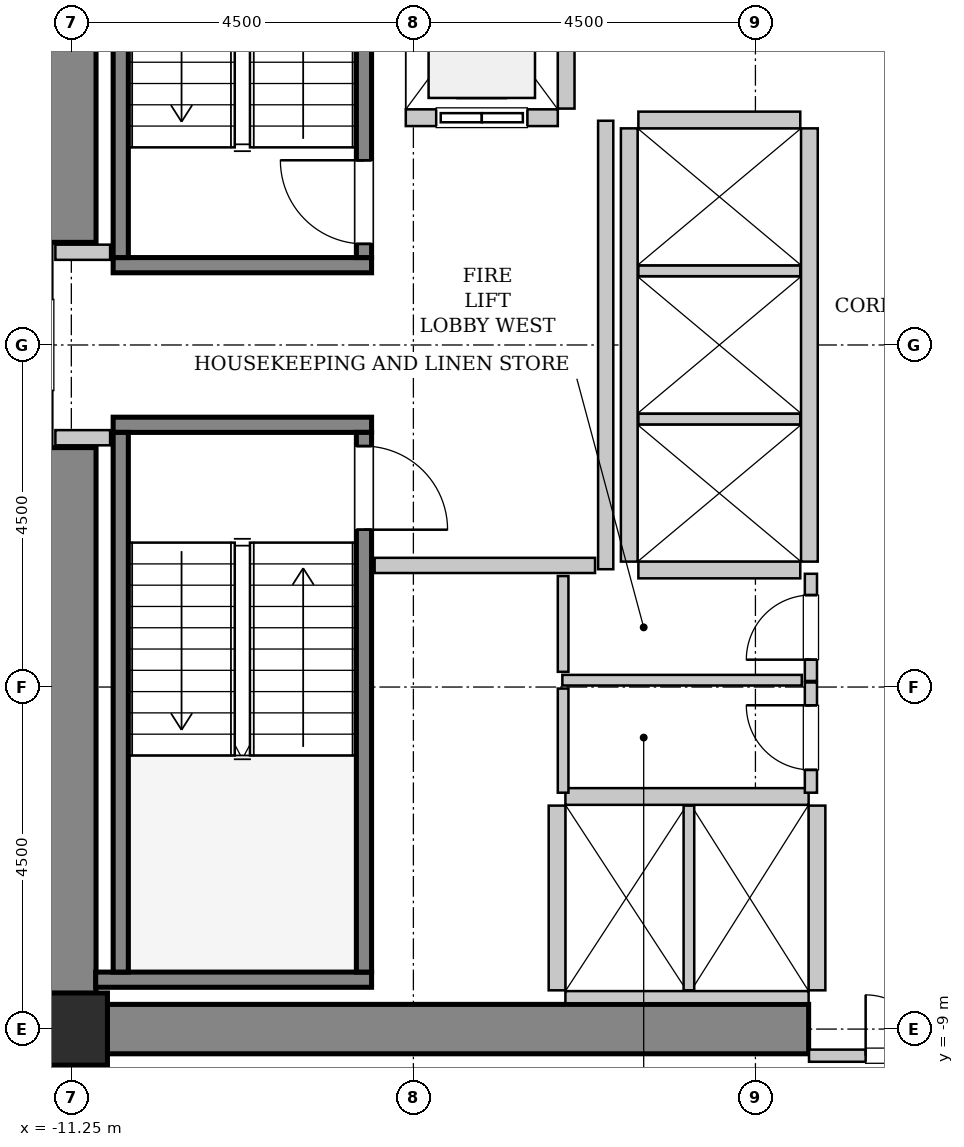
"""IFC4 building model, lengths in metres.
Left out: names, types, materials, properties, quantities, classifications, styles, units other than length and angle.
Written with IfcOpenShell. Run it as: python <this file> out.ifc"""

import sys

from ifc_helpers import new_model, si_unit, direction, frame, frame_2d, origin, origin_2d, place, context, subcontext, project, spatial, rectangle, hollow_rectangle, extrude, source, transform, mapped, element, fill, save


model = new_model("IFC4")
c1 = context("Model", 3, precision=1e-05, world=origin(), true_north=direction((0.0, 1.0)))
c2 = subcontext(c1, "Body", "Model", "MODEL_VIEW")
j1 = project(units=[si_unit("LENGTHUNIT", "METRE"), si_unit("PLANEANGLEUNIT", "RADIAN")], contexts=[c1])
p1 = place(None, origin())
s1 = spatial("IfcSite", under=j1, at=p1, CompositionType="ELEMENT")
p2 = place(p1, origin())
s2 = spatial("IfcBuilding", under=s1, at=p2, CompositionType="ELEMENT")
p3 = place(p2, frame((0.0, 0.0, 71.0)))
s3 = spatial("IfcBuildingStorey", under=s2, at=p3, CompositionType="ELEMENT", Elevation=71.0)
m1 = source(origin(), c2, "Body", "SweptSolid", [
    extrude(rectangle(XDim=10.025, YDim=0.65, at=frame_2d((5.012, 0.0))), origin(), (0.0, 0.0, 1.0), 3.8),
])
p4 = place(p3, frame((-11.575, -9.0, 0.0), z_axis=(0.0, 0.0, 1.0), x_axis=(1.0, 0.0, 0.0)))
e1 = element("IfcWall", 1, at=p4, inside=s3, PredefinedType="SHEAR", context=c2, shape_type="MappedRepresentation", body=[
    mapped(m1, transform((0.0, 0.0, 0.0), x_axis=(1.0, 0.0, 0.0), y_axis=(0.0, 1.0, 0.0), z_axis=(0.0, 0.0, 1.0), scale=1.0)),
])
m2 = source(origin(), c2, "Body", "SweptSolid", [
    extrude(rectangle(XDim=7.325, YDim=0.65, at=frame_2d((3.663, 0.0))), origin(), (0.0, 0.0, 1.0), 3.8),
])
for number, where, z_axis, x_axis in (
    (2, (-11.25, -8.675, 0.0), (0.0, 0.0, 1.0), (0.0, 1.0, 0.0)),
    (3, (-11.25, 1.35, 0.0), (0.0, 0.0, 1.0), (0.0, 1.0, 0.0)),
):
    element("IfcWall", number, at=place(p3, frame(where, z_axis=z_axis, x_axis=x_axis)), inside=s3, PredefinedType="SHEAR", context=c2, shape_type="MappedRepresentation", body=[
        mapped(m2, transform((0.0, 0.0, 0.0), x_axis=(1.0, 0.0, 0.0), y_axis=(0.0, 1.0, 0.0), z_axis=(0.0, 0.0, 1.0), scale=1.0)),
    ])
m3 = source(origin(), c2, "Body", "SweptSolid", [
    extrude(hollow_rectangle(XDim=0.95, YDim=0.95, WallThickness=0.045, InnerFilletRadius=0.045, OuterFilletRadius=0.09, at=origin_2d()), origin(), (0.0, 0.0, 1.0), 3.8),
])
p5 = place(p3, frame((-11.25, -9.0, 0.0), z_axis=(0.0, 0.0, 1.0), x_axis=(1.0, 0.0, 0.0)))
e4 = element("IfcColumn", 4, at=p5, inside=s3, PredefinedType="COLUMN", context=c2, shape_type="MappedRepresentation", body=[
    mapped(m3, transform((0.0, 0.0, 0.0), x_axis=(1.0, 0.0, 0.0), y_axis=(0.0, 1.0, 0.0), z_axis=(0.0, 0.0, 1.0), scale=1.0)),
])
m4 = source(origin(), c2, "Body", "SweptSolid", [
    extrude(rectangle(XDim=3.4, YDim=0.2, at=frame_2d((1.7, 0.0))), origin(), (0.0, 0.0, 1.0), 3.8),
])
p6 = place(p3, frame((-7.3, 1.05, 0.0), z_axis=(0.0, 0.0, 1.0), x_axis=(-1.0, 0.0, 0.0)))
e5 = element("IfcWall", 5, at=p6, inside=s3, PredefinedType="SOLIDWALL", context=c2, shape_type="MappedRepresentation", body=[
    mapped(m4, transform((0.0, 0.0, 0.0), x_axis=(1.0, 0.0, 0.0), y_axis=(0.0, 1.0, 0.0), z_axis=(0.0, 0.0, 1.0), scale=1.0)),
])
m5 = source(origin(), c2, "Body", "SweptSolid", [
    extrude(rectangle(XDim=7.1, YDim=0.2, at=frame_2d((3.55, 0.0))), origin(), (0.0, 0.0, 1.0), 3.8),
])
p7 = place(p3, frame((-7.4, 1.15, 0.0), z_axis=(0.0, 0.0, 1.0), x_axis=(0.0, 1.0, 0.0)))
e6 = element("IfcWall", 6, at=p7, inside=s3, PredefinedType="SOLIDWALL", context=c2, shape_type="MappedRepresentation", body=[
    mapped(m5, transform((0.0, 0.0, 0.0), x_axis=(1.0, 0.0, 0.0), y_axis=(0.0, 1.0, 0.0), z_axis=(0.0, 0.0, 1.0), scale=1.0)),
])
p8 = place(p7, frame((0.18, 0.0, 0.0)))
e7 = element("IfcOpeningElement", 7, at=p8, cuts=e6, PredefinedType="OPENING", context=c2, shape_type="SweptSolid", body=[
    extrude(rectangle(XDim=1.1, YDim=2.15, at=frame_2d((0.55, 1.075))), frame((0.0, 0.11, 0.0), z_axis=(0.0, -1.0, 0.0), x_axis=(1.0, 0.0, 0.0)), (0.0, 0.0, 1.0), 0.22),
])
p9 = place(p3, frame((-10.6, 1.15, 0.0), z_axis=(0.0, 0.0, 1.0), x_axis=(0.0, 1.0, 0.0)))
e8 = element("IfcWall", 8, at=p9, inside=s3, PredefinedType="SOLIDWALL", context=c2, shape_type="MappedRepresentation", body=[
    mapped(m5, transform((0.0, 0.0, 0.0), x_axis=(1.0, 0.0, 0.0), y_axis=(0.0, 1.0, 0.0), z_axis=(0.0, 0.0, 1.0), scale=1.0)),
])
p10 = place(p3, frame((-10.7, -1.05, 0.0), z_axis=(0.0, 0.0, 1.0), x_axis=(1.0, 0.0, 0.0)))
e9 = element("IfcWall", 9, at=p10, inside=s3, PredefinedType="SOLIDWALL", context=c2, shape_type="MappedRepresentation", body=[
    mapped(m4, transform((0.0, 0.0, 0.0), x_axis=(1.0, 0.0, 0.0), y_axis=(0.0, 1.0, 0.0), z_axis=(0.0, 0.0, 1.0), scale=1.0)),
])
m6 = source(origin(), c2, "Body", "SweptSolid", [
    extrude(rectangle(XDim=3.63, YDim=0.2, at=frame_2d((1.815, 0.0))), origin(), (0.0, 0.0, 1.0), 3.8),
])
p11 = place(p3, frame((-10.93, -8.35, 0.0), z_axis=(0.0, 0.0, 1.0), x_axis=(1.0, 0.0, 0.0)))
e10 = element("IfcWall", 10, at=p11, inside=s3, PredefinedType="SOLIDWALL", context=c2, shape_type="MappedRepresentation", body=[
    mapped(m6, transform((0.0, 0.0, 0.0), x_axis=(1.0, 0.0, 0.0), y_axis=(0.0, 1.0, 0.0), z_axis=(0.0, 0.0, 1.0), scale=1.0)),
])
p12 = place(p3, frame((-10.6, -1.15, 0.0), z_axis=(0.0, 0.0, 1.0), x_axis=(0.0, -1.0, 0.0)))
e11 = element("IfcWall", 11, at=p12, inside=s3, PredefinedType="SOLIDWALL", context=c2, shape_type="MappedRepresentation", body=[
    mapped(m5, transform((0.0, 0.0, 0.0), x_axis=(1.0, 0.0, 0.0), y_axis=(0.0, 1.0, 0.0), z_axis=(0.0, 0.0, 1.0), scale=1.0)),
])
p13 = place(p3, frame((-7.4, -1.15, 0.0), z_axis=(0.0, 0.0, 1.0), x_axis=(0.0, -1.0, 0.0)))
e12 = element("IfcWall", 12, at=p13, inside=s3, PredefinedType="SOLIDWALL", context=c2, shape_type="MappedRepresentation", body=[
    mapped(m5, transform((0.0, 0.0, 0.0), x_axis=(1.0, 0.0, 0.0), y_axis=(0.0, 1.0, 0.0), z_axis=(0.0, 0.0, 1.0), scale=1.0)),
])
p14 = place(p13, frame((0.18, 0.0, 0.0)))
e13 = element("IfcOpeningElement", 13, at=p14, cuts=e12, PredefinedType="OPENING", context=c2, shape_type="SweptSolid", body=[
    extrude(rectangle(XDim=1.1, YDim=2.15, at=frame_2d((0.55, 1.075))), frame((0.0, 0.11, 0.0), z_axis=(0.0, -1.0, 0.0), x_axis=(1.0, 0.0, 0.0)), (0.0, 0.0, 1.0), 0.22),
])
m7 = source(origin(), c2, "Body", "SweptSolid", [
    extrude(rectangle(XDim=2.0, YDim=0.22, at=frame_2d((1.0, 0.0))), origin(), (0.0, 0.0, 1.0), 3.535),
])
p15 = place(p3, frame((-6.85, 2.99, 0.0), z_axis=(0.0, 0.0, 1.0), x_axis=(1.0, 0.0, 0.0)))
e14 = element("IfcWall", 14, at=p15, inside=s3, PredefinedType="SOLIDWALL", context=c2, shape_type="MappedRepresentation", body=[
    mapped(m7, transform((0.0, 0.0, 0.0), x_axis=(1.0, 0.0, 0.0), y_axis=(0.0, 1.0, 0.0), z_axis=(0.0, 0.0, 1.0), scale=1.0)),
])
p16 = place(p15, frame((0.4, 0.0, 0.0)))
e15 = element("IfcOpeningElement", 15, at=p16, cuts=e14, PredefinedType="OPENING", context=c2, shape_type="SweptSolid", body=[
    extrude(rectangle(XDim=1.2, YDim=2.2, at=frame_2d((0.6, 1.1))), frame((0.0, 0.12, 0.0), z_axis=(0.0, -1.0, 0.0), x_axis=(1.0, 0.0, 0.0)), (0.0, 0.0, 1.0), 0.24),
])
m8 = source(origin(), c2, "Body", "SweptSolid", [
    extrude(rectangle(XDim=2.68, YDim=0.22, at=frame_2d((1.34, 0.0))), origin(), (0.0, 0.0, 1.0), 3.535),
])
p17 = place(p3, frame((-4.74, 3.11, 0.0), z_axis=(0.0, 0.0, 1.0), x_axis=(0.0, 1.0, 0.0)))
e16 = element("IfcWall", 16, at=p17, inside=s3, PredefinedType="SOLIDWALL", context=c2, shape_type="MappedRepresentation", body=[
    mapped(m8, transform((0.0, 0.0, 0.0), x_axis=(1.0, 0.0, 0.0), y_axis=(0.0, 1.0, 0.0), z_axis=(0.0, 0.0, 1.0), scale=1.0)),
])
m9 = source(origin(), c2, "Body", "SweptSolid", [
    extrude(rectangle(XDim=3.2, YDim=0.22, at=frame_2d((1.6, 0.0))), origin(), (0.0, 0.0, 1.0), 3.535),
])
p18 = place(p3, frame((-1.55, -5.94, 0.0), z_axis=(0.0, 0.0, 1.0), x_axis=(-1.0, 0.0, 0.0)))
e17 = element("IfcWall", 17, at=p18, inside=s3, PredefinedType="SOLIDWALL", context=c2, shape_type="MappedRepresentation", body=[
    mapped(m9, transform((0.0, 0.0, 0.0), x_axis=(1.0, 0.0, 0.0), y_axis=(0.0, 1.0, 0.0), z_axis=(0.0, 0.0, 1.0), scale=1.0)),
])
m10 = source(origin(), c2, "Body", "SweptSolid", [
    extrude(rectangle(XDim=3.2, YDim=0.16, at=frame_2d((1.6, 0.0))), origin(), (0.0, 0.0, 1.0), 2.425),
])
p19 = place(p3, frame((-4.75, -8.58, 0.0), z_axis=(0.0, 0.0, 1.0), x_axis=(1.0, 0.0, 0.0)))
e18 = element("IfcWall", 18, at=p19, inside=s3, PredefinedType="PARTITIONING", context=c2, shape_type="MappedRepresentation", body=[
    mapped(m10, transform((0.0, 0.0, 0.0), x_axis=(1.0, 0.0, 0.0), y_axis=(0.0, 1.0, 0.0), z_axis=(0.0, 0.0, 1.0), scale=1.0)),
])
m11 = source(origin(), c2, "Body", "SweptSolid", [
    extrude(rectangle(XDim=2.43, YDim=0.22, at=frame_2d((1.215, 0.0))), origin(), (0.0, 0.0, 1.0), 3.535),
])
p20 = place(p3, frame((-4.86, -6.06, 0.0), z_axis=(0.0, 0.0, 1.0), x_axis=(0.0, -1.0, 0.0)))
e19 = element("IfcWall", 19, at=p20, inside=s3, PredefinedType="SOLIDWALL", context=c2, shape_type="MappedRepresentation", body=[
    mapped(m11, transform((0.0, 0.0, 0.0), x_axis=(1.0, 0.0, 0.0), y_axis=(0.0, 1.0, 0.0), z_axis=(0.0, 0.0, 1.0), scale=1.0)),
])
m12 = source(origin(), c2, "Body", "SweptSolid", [
    extrude(rectangle(XDim=2.43, YDim=0.14, at=frame_2d((1.215, 0.0))), origin(), (0.0, 0.0, 1.0), 3.535),
])
p21 = place(p3, frame((-3.125, -8.49, 0.0), z_axis=(0.0, 0.0, 1.0), x_axis=(0.0, 1.0, 0.0)))
e20 = element("IfcWall", 20, at=p21, inside=s3, PredefinedType="PARTITIONING", context=c2, shape_type="MappedRepresentation", body=[
    mapped(m12, transform((0.0, 0.0, 0.0), x_axis=(1.0, 0.0, 0.0), y_axis=(0.0, 1.0, 0.0), z_axis=(0.0, 0.0, 1.0), scale=1.0)),
])
p22 = place(p3, frame((-1.44, -8.49, 0.0), z_axis=(0.0, 0.0, 1.0), x_axis=(0.0, 1.0, 0.0)))
e21 = element("IfcWall", 21, at=p22, inside=s3, PredefinedType="SOLIDWALL", context=c2, shape_type="MappedRepresentation", body=[
    mapped(m11, transform((0.0, 0.0, 0.0), x_axis=(1.0, 0.0, 0.0), y_axis=(0.0, 1.0, 0.0), z_axis=(0.0, 0.0, 1.0), scale=1.0)),
])
m13 = source(origin(), c2, "Body", "SweptSolid", [
    extrude(rectangle(XDim=5.7, YDim=0.22, at=frame_2d((2.85, 0.0))), origin(), (0.0, 0.0, 1.0), 3.535),
])
for number, where, z_axis, x_axis in (
    (22, (-1.54, -2.85, 0.0), (0.0, 0.0, 1.0), (0.0, 1.0, 0.0)),
    (23, (-3.91, 2.85, 0.0), (0.0, 0.0, 1.0), (0.0, -1.0, 0.0)),
):
    element("IfcWall", number, at=place(p3, frame(where, z_axis=z_axis, x_axis=x_axis)), inside=s3, PredefinedType="SOLIDWALL", context=c2, shape_type="MappedRepresentation", body=[
        mapped(m13, transform((0.0, 0.0, 0.0), x_axis=(1.0, 0.0, 0.0), y_axis=(0.0, 1.0, 0.0), z_axis=(0.0, 0.0, 1.0), scale=1.0)),
    ])
m14 = source(origin(), c2, "Body", "SweptSolid", [
    extrude(rectangle(XDim=2.13, YDim=0.22, at=frame_2d((1.065, 0.0))), origin(), (0.0, 0.0, 1.0), 3.535),
])
p23 = place(p3, frame((-3.79, -2.96, 0.0), z_axis=(0.0, 0.0, 1.0), x_axis=(1.0, 0.0, 0.0)))
e24 = element("IfcWall", 24, at=p23, inside=s3, PredefinedType="SOLIDWALL", context=c2, shape_type="MappedRepresentation", body=[
    mapped(m14, transform((0.0, 0.0, 0.0), x_axis=(1.0, 0.0, 0.0), y_axis=(0.0, 1.0, 0.0), z_axis=(0.0, 0.0, 1.0), scale=1.0)),
])
m15 = source(origin(), c2, "Body", "SweptSolid", [
    extrude(rectangle(XDim=2.13, YDim=0.14, at=frame_2d((1.065, 0.0))), origin(), (0.0, 0.0, 1.0), 3.535),
])
for number, where, z_axis, x_axis in (
    (25, (-3.79, -0.975, 0.0), (0.0, 0.0, 1.0), (1.0, 0.0, 0.0)),
    (26, (-3.79, 0.975, 0.0), (0.0, 0.0, 1.0), (1.0, 0.0, 0.0)),
):
    element("IfcWall", number, at=place(p3, frame(where, z_axis=z_axis, x_axis=x_axis)), inside=s3, PredefinedType="PARTITIONING", context=c2, shape_type="MappedRepresentation", body=[
        mapped(m15, transform((0.0, 0.0, 0.0), x_axis=(1.0, 0.0, 0.0), y_axis=(0.0, 1.0, 0.0), z_axis=(0.0, 0.0, 1.0), scale=1.0)),
    ])
p24 = place(p3, frame((-1.66, 2.96, 0.0), z_axis=(0.0, 0.0, 1.0), x_axis=(-1.0, 0.0, 0.0)))
e27 = element("IfcWall", 27, at=p24, inside=s3, PredefinedType="SOLIDWALL", context=c2, shape_type="MappedRepresentation", body=[
    mapped(m14, transform((0.0, 0.0, 0.0), x_axis=(1.0, 0.0, 0.0), y_axis=(0.0, 1.0, 0.0), z_axis=(0.0, 0.0, 1.0), scale=1.0)),
])
m16 = source(origin(), c2, "Body", "SweptSolid", [
    extrude(rectangle(XDim=5.9, YDim=0.2, at=frame_2d((2.95, 0.0))), origin(), (0.0, 0.0, 1.0), 3.535),
])
p25 = place(p3, frame((-4.22, -2.95, 0.0), z_axis=(0.0, 0.0, 1.0), x_axis=(0.0, 1.0, 0.0)))
e28 = element("IfcWall", 28, at=p25, inside=s3, PredefinedType="PARTITIONING", context=c2, shape_type="MappedRepresentation", body=[
    mapped(m16, transform((0.0, 0.0, 0.0), x_axis=(1.0, 0.0, 0.0), y_axis=(0.0, 1.0, 0.0), z_axis=(0.0, 0.0, 1.0), scale=1.0)),
])
m17 = source(origin(), c2, "Body", "SweptSolid", [
    extrude(rectangle(XDim=2.9, YDim=0.2, at=frame_2d((1.45, 0.0))), origin(), (0.0, 0.0, 1.0), 3.535),
])
p26 = place(p3, frame((-7.26, -2.9, 0.0), z_axis=(0.0, 0.0, 1.0), x_axis=(1.0, 0.0, 0.0)))
e29 = element("IfcWall", 29, at=p26, inside=s3, PredefinedType="PARTITIONING", context=c2, shape_type="MappedRepresentation", body=[
    mapped(m17, transform((0.0, 0.0, 0.0), x_axis=(1.0, 0.0, 0.0), y_axis=(0.0, 1.0, 0.0), z_axis=(0.0, 0.0, 1.0), scale=1.0)),
])
m18 = source(origin(), c2, "Body", "SweptSolid", [
    extrude(rectangle(XDim=0.72, YDim=0.2, at=frame_2d((0.36, 0.0))), origin(), (0.0, 0.0, 1.0), 3.535),
])
for number, where, z_axis, x_axis in (
    (30, (-11.46, 1.22, 0.0), (0.0, 0.0, 1.0), (1.0, 0.0, 0.0)),
    (31, (-11.46, -1.22, 0.0), (0.0, 0.0, 1.0), (1.0, 0.0, 0.0)),
):
    element("IfcWall", number, at=place(p3, frame(where, z_axis=z_axis, x_axis=x_axis)), inside=s3, PredefinedType="PARTITIONING", context=c2, shape_type="MappedRepresentation", body=[
        mapped(m18, transform((0.0, 0.0, 0.0), x_axis=(1.0, 0.0, 0.0), y_axis=(0.0, 1.0, 0.0), z_axis=(0.0, 0.0, 1.0), scale=1.0)),
    ])
m19 = source(origin(), c2, "Body", "SweptSolid", [
    extrude(rectangle(XDim=3.09, YDim=0.16, at=frame_2d((1.545, 0.0))), origin(), (0.0, 0.0, 1.0), 2.425),
])
p27 = place(p3, frame((-1.545, -9.35, 0.0), z_axis=(0.0, 0.0, 1.0), x_axis=(1.0, 0.0, 0.0)))
e32 = element("IfcWall", 32, at=p27, inside=s3, PredefinedType="PARTITIONING", context=c2, shape_type="MappedRepresentation", body=[
    mapped(m19, transform((0.0, 0.0, 0.0), x_axis=(1.0, 0.0, 0.0), y_axis=(0.0, 1.0, 0.0), z_axis=(0.0, 0.0, 1.0), scale=1.0)),
])
p28 = place(p27, frame((0.745, 0.0, 0.0)))
e33 = element("IfcOpeningElement", 33, at=p28, cuts=e32, PredefinedType="OPENING", context=c2, shape_type="SweptSolid", body=[
    extrude(rectangle(XDim=1.6, YDim=2.3, at=frame_2d((0.8, 1.15))), frame((0.0, 0.09, 0.0), z_axis=(0.0, -1.0, 0.0), x_axis=(1.0, 0.0, 0.0)), (0.0, 0.0, 1.0), 0.18),
])
m20 = source(origin(), c2, "Body", "SweptSolid", [
    extrude(rectangle(XDim=1.41, YDim=0.16, at=frame_2d((0.705, 0.0))), origin(), (0.0, 0.0, 1.0), 3.535),
])
p29 = place(p3, frame((-1.52, -4.42, 0.0), z_axis=(0.0, 0.0, 1.0), x_axis=(0.0, 1.0, 0.0)))
e34 = element("IfcWall", 34, at=p29, inside=s3, PredefinedType="PARTITIONING", context=c2, shape_type="MappedRepresentation", body=[
    mapped(m20, transform((0.0, 0.0, 0.0), x_axis=(1.0, 0.0, 0.0), y_axis=(0.0, 1.0, 0.0), z_axis=(0.0, 0.0, 1.0), scale=1.0)),
])
p30 = place(p29, frame((0.28, 0.0, 0.0)))
e35 = element("IfcOpeningElement", 35, at=p30, cuts=e34, PredefinedType="OPENING", context=c2, shape_type="SweptSolid", body=[
    extrude(rectangle(XDim=0.85, YDim=2.1, at=frame_2d((0.425, 1.05))), frame((0.0, 0.09, 0.0), z_axis=(0.0, -1.0, 0.0), x_axis=(1.0, 0.0, 0.0)), (0.0, 0.0, 1.0), 0.18),
])
m21 = source(origin(), c2, "Body", "SweptSolid", [
    extrude(rectangle(XDim=3.15, YDim=0.14, at=frame_2d((1.575, 0.0))), origin(), (0.0, 0.0, 1.0), 3.535),
])
p31 = place(p3, frame((-4.79, -4.41, 0.0), z_axis=(0.0, 0.0, 1.0), x_axis=(1.0, 0.0, 0.0)))
e36 = element("IfcWall", 36, at=p31, inside=s3, PredefinedType="PARTITIONING", context=c2, shape_type="MappedRepresentation", body=[
    mapped(m21, transform((0.0, 0.0, 0.0), x_axis=(1.0, 0.0, 0.0), y_axis=(0.0, 1.0, 0.0), z_axis=(0.0, 0.0, 1.0), scale=1.0)),
])
m22 = source(origin(), c2, "Body", "SweptSolid", [
    extrude(rectangle(XDim=1.26, YDim=0.14, at=frame_2d((0.63, 0.0))), origin(), (0.0, 0.0, 1.0), 3.535),
])
p32 = place(p3, frame((-4.78, -4.3, 0.0), z_axis=(0.0, 0.0, 1.0), x_axis=(0.0, 1.0, 0.0)))
e37 = element("IfcWall", 37, at=p32, inside=s3, PredefinedType="PARTITIONING", context=c2, shape_type="MappedRepresentation", body=[
    mapped(m22, transform((0.0, 0.0, 0.0), x_axis=(1.0, 0.0, 0.0), y_axis=(0.0, 1.0, 0.0), z_axis=(0.0, 0.0, 1.0), scale=1.0)),
])
m23 = source(origin(), c2, "Body", "SweptSolid", [
    extrude(rectangle(XDim=1.45, YDim=0.16, at=frame_2d((0.725, 0.0))), origin(), (0.0, 0.0, 1.0), 3.535),
])
p33 = place(p3, frame((-1.52, -5.89, 0.0), z_axis=(0.0, 0.0, 1.0), x_axis=(0.0, 1.0, 0.0)))
e38 = element("IfcWall", 38, at=p33, inside=s3, PredefinedType="PARTITIONING", context=c2, shape_type="MappedRepresentation", body=[
    mapped(m23, transform((0.0, 0.0, 0.0), x_axis=(1.0, 0.0, 0.0), y_axis=(0.0, 1.0, 0.0), z_axis=(0.0, 0.0, 1.0), scale=1.0)),
])
p34 = place(p33, frame((0.3, 0.0, 0.0)))
e39 = element("IfcOpeningElement", 39, at=p34, cuts=e38, PredefinedType="OPENING", context=c2, shape_type="SweptSolid", body=[
    extrude(rectangle(XDim=0.85, YDim=2.1, at=frame_2d((0.425, 1.05))), frame((0.0, 0.09, 0.0), z_axis=(0.0, -1.0, 0.0), x_axis=(1.0, 0.0, 0.0)), (0.0, 0.0, 1.0), 0.18),
])
m24 = source(origin(), c2, "Body", "SweptSolid", [
    extrude(rectangle(XDim=1.37, YDim=0.14, at=frame_2d((0.685, 0.0))), origin(), (0.0, 0.0, 1.0), 3.535),
])
p35 = place(p3, frame((-4.78, -5.89, 0.0), z_axis=(0.0, 0.0, 1.0), x_axis=(0.0, 1.0, 0.0)))
e40 = element("IfcWall", 40, at=p35, inside=s3, PredefinedType="PARTITIONING", context=c2, shape_type="MappedRepresentation", body=[
    mapped(m24, transform((0.0, 0.0, 0.0), x_axis=(1.0, 0.0, 0.0), y_axis=(0.0, 1.0, 0.0), z_axis=(0.0, 0.0, 1.0), scale=1.0)),
])
m25 = source(origin(), c2, "Body", "SweptSolid", [
    extrude(rectangle(XDim=1.1, YDim=2.15, at=frame_2d((0.55, 1.075))), frame((0.0, 0.025, 0.0), z_axis=(0.0, -1.0, 0.0), x_axis=(1.0, 0.0, 0.0)), (0.0, 0.0, 1.0), 0.05),
])
p36 = place(p8, origin())
e41 = element("IfcDoor", 41, at=p36, inside=s3, OperationType="SINGLE_SWING_RIGHT", PredefinedType="DOOR", context=c2, shape_type="MappedRepresentation", body=[
    mapped(m25, transform((0.0, 0.0, 0.0), x_axis=(1.0, 0.0, 0.0), y_axis=(0.0, 1.0, 0.0), z_axis=(0.0, 0.0, 1.0), scale=1.0)),
])
fill(e7, e41)
p37 = place(p14, origin())
e42 = element("IfcDoor", 42, at=p37, inside=s3, OperationType="SINGLE_SWING_RIGHT", PredefinedType="DOOR", context=c2, shape_type="MappedRepresentation", body=[
    mapped(m25, transform((0.0, 0.0, 0.0), x_axis=(1.0, 0.0, 0.0), y_axis=(0.0, 1.0, 0.0), z_axis=(0.0, 0.0, 1.0), scale=1.0)),
])
fill(e13, e42)
m26 = source(origin(), c2, "Body", "SweptSolid", [
    extrude(rectangle(XDim=1.2, YDim=2.2, at=frame_2d((0.6, 1.1))), frame((0.0, 0.025, 0.0), z_axis=(0.0, -1.0, 0.0), x_axis=(1.0, 0.0, 0.0)), (0.0, 0.0, 1.0), 0.05),
])
p38 = place(p16, origin())
e43 = element("IfcDoor", 43, at=p38, inside=s3, OperationType="SLIDING_TO_LEFT", PredefinedType="DOOR", context=c2, shape_type="MappedRepresentation", body=[
    mapped(m26, transform((0.0, 0.0, 0.0), x_axis=(1.0, 0.0, 0.0), y_axis=(0.0, 1.0, 0.0), z_axis=(0.0, 0.0, 1.0), scale=1.0)),
])
fill(e15, e43)
m27 = source(origin(), c2, "Body", "SweptSolid", [
    extrude(rectangle(XDim=1.6, YDim=2.3, at=frame_2d((0.8, 1.15))), frame((0.0, 0.025, 0.0), z_axis=(0.0, -1.0, 0.0), x_axis=(1.0, 0.0, 0.0)), (0.0, 0.0, 1.0), 0.05),
])
p39 = place(p28, origin())
e44 = element("IfcDoor", 44, at=p39, inside=s3, OperationType="DOUBLE_DOOR_SINGLE_SWING", PredefinedType="DOOR", context=c2, shape_type="MappedRepresentation", body=[
    mapped(m27, transform((0.0, 0.0, 0.0), x_axis=(1.0, 0.0, 0.0), y_axis=(0.0, 1.0, 0.0), z_axis=(0.0, 0.0, 1.0), scale=1.0)),
])
fill(e33, e44)
m28 = source(origin(), c2, "Body", "SweptSolid", [
    extrude(rectangle(XDim=0.85, YDim=2.1, at=frame_2d((0.425, 1.05))), frame((0.0, 0.025, 0.0), z_axis=(0.0, -1.0, 0.0), x_axis=(1.0, 0.0, 0.0)), (0.0, 0.0, 1.0), 0.05),
])
p40 = place(p30, origin())
e45 = element("IfcDoor", 45, at=p40, inside=s3, OperationType="SINGLE_SWING_LEFT", PredefinedType="DOOR", context=c2, shape_type="MappedRepresentation", body=[
    mapped(m28, transform((0.0, 0.0, 0.0), x_axis=(1.0, 0.0, 0.0), y_axis=(0.0, 1.0, 0.0), z_axis=(0.0, 0.0, 1.0), scale=1.0)),
])
fill(e35, e45)
p41 = place(p34, origin())
e46 = element("IfcDoor", 46, at=p41, inside=s3, OperationType="SINGLE_SWING_RIGHT", PredefinedType="DOOR", context=c2, shape_type="MappedRepresentation", body=[
    mapped(m28, transform((0.0, 0.0, 0.0), x_axis=(1.0, 0.0, 0.0), y_axis=(0.0, 1.0, 0.0), z_axis=(0.0, 0.0, 1.0), scale=1.0)),
])
fill(e39, e46)
save(model, sys.argv[1])
